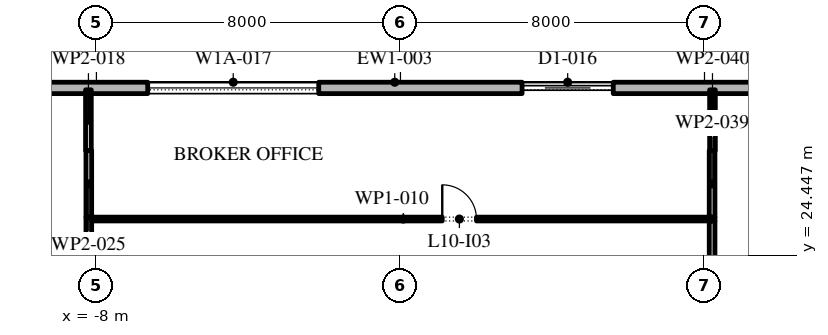
"""IFC4 building model, lengths in metres.
Left out: names, types, materials, properties, quantities, classifications, styles, units other than length and angle.
Written with IfcOpenShell. Run it as: python <this file> out.ifc"""

import sys

from ifc_helpers import new_model, si_unit, direction, frame, frame_2d, origin, place, context, subcontext, project, spatial, rectangle, extrude, element, fill, save


model = new_model("IFC4")
c1 = context("Model", 3, precision=1e-05, world=origin(), true_north=direction((0.0, 1.0)))
c2 = subcontext(c1, "Body", "Model", "MODEL_VIEW")
j1 = project(units=[si_unit("LENGTHUNIT", "METRE"), si_unit("PLANEANGLEUNIT", "RADIAN")], contexts=[c1])
p1 = place(None, origin())
s1 = spatial("IfcSite", under=j1, at=p1, CompositionType="ELEMENT")
p2 = place(p1, origin())
s2 = spatial("IfcBuilding", under=s1, at=p2, CompositionType="ELEMENT")
p3 = place(p2, frame((0.0, 0.0, 52.2)))
s3 = spatial("IfcBuildingStorey", under=s2, at=p3, CompositionType="ELEMENT", Elevation=52.2)
p4 = place(p3, frame((26.1, 28.85, 0.0), z_axis=(0.0, 0.0, 1.0), x_axis=(-1.0, 0.0, 0.0)))
e1 = element("IfcWall", 1, at=p4, inside=s3, PredefinedType="STANDARD", context=c2, shape_type="SweptSolid", body=[
    extrude(rectangle(XDim=52.5, YDim=0.3, at=frame_2d((26.25, 0.0))), origin(), (0.0, 0.0, 1.0), 4.0),
])
p5 = place(p4, frame((2.0, 0.0, 0.45)))
e2 = element("IfcOpeningElement", 2, at=p5, cuts=e1, PredefinedType="OPENING", context=c2, shape_type="SweptSolid", body=[
    extrude(rectangle(XDim=4.5, YDim=3.0, at=frame_2d((2.25, 1.5))), frame((0.0, 0.16, 0.0), z_axis=(0.0, -1.0, 0.0), x_axis=(1.0, 0.0, 0.0)), (0.0, 0.0, 1.0), 0.32),
])
p6 = place(p4, frame((10.65, 0.0, 0.45)))
e3 = element("IfcOpeningElement", 3, at=p6, cuts=e1, PredefinedType="OPENING", context=c2, shape_type="SweptSolid", body=[
    extrude(rectangle(XDim=4.5, YDim=3.0, at=frame_2d((2.25, 1.5))), frame((0.0, 0.16, 0.0), z_axis=(0.0, -1.0, 0.0), x_axis=(1.0, 0.0, 0.0)), (0.0, 0.0, 1.0), 0.32),
])
p7 = place(p4, frame((20.5, 0.0, 0.0)))
e4 = element("IfcOpeningElement", 4, at=p7, cuts=e1, PredefinedType="OPENING", context=c2, shape_type="SweptSolid", body=[
    extrude(rectangle(XDim=2.4, YDim=3.5, at=frame_2d((1.2, 1.75))), frame((0.0, 0.16, 0.0), z_axis=(0.0, -1.0, 0.0), x_axis=(1.0, 0.0, 0.0)), (0.0, 0.0, 1.0), 0.32),
])
p8 = place(p4, frame((28.25, 0.0, 0.45)))
e5 = element("IfcOpeningElement", 5, at=p8, cuts=e1, PredefinedType="OPENING", context=c2, shape_type="SweptSolid", body=[
    extrude(rectangle(XDim=4.5, YDim=3.0, at=frame_2d((2.25, 1.5))), frame((0.0, 0.16, 0.0), z_axis=(0.0, -1.0, 0.0), x_axis=(1.0, 0.0, 0.0)), (0.0, 0.0, 1.0), 0.32),
])
p9 = place(p4, frame((37.05, 0.0, 0.45)))
e6 = element("IfcOpeningElement", 6, at=p9, cuts=e1, PredefinedType="OPENING", context=c2, shape_type="SweptSolid", body=[
    extrude(rectangle(XDim=4.5, YDim=3.0, at=frame_2d((2.25, 1.5))), frame((0.0, 0.16, 0.0), z_axis=(0.0, -1.0, 0.0), x_axis=(1.0, 0.0, 0.0)), (0.0, 0.0, 1.0), 0.32),
])
p10 = place(p4, frame((45.85, 0.0, 0.45)))
e7 = element("IfcOpeningElement", 7, at=p10, cuts=e1, PredefinedType="OPENING", context=c2, shape_type="SweptSolid", body=[
    extrude(rectangle(XDim=4.5, YDim=3.0, at=frame_2d((2.25, 1.5))), frame((0.0, 0.16, 0.0), z_axis=(0.0, -1.0, 0.0), x_axis=(1.0, 0.0, 0.0)), (0.0, 0.0, 1.0), 0.32),
])
p11 = place(p3, frame((-8.21, 28.8, 0.0), z_axis=(0.0, 0.0, 1.0), x_axis=(0.0, -1.0, 0.0)))
e8 = element("IfcWall", 8, at=p11, inside=s3, PredefinedType="PARTITIONING", context=c2, shape_type="SweptSolid", body=[
    extrude(rectangle(XDim=1.6, YDim=0.15, at=frame_2d((0.8, 0.0))), origin(), (0.0, 0.0, 1.0), 4.0),
])
p12 = place(p3, frame((-8.2, 25.45, 0.0), z_axis=(0.0, 0.0, 1.0), x_axis=(0.0, -1.0, 0.0)))
e9 = element("IfcWall", 9, at=p12, inside=s3, PredefinedType="PARTITIONING", context=c2, shape_type="SweptSolid", body=[
    extrude(rectangle(XDim=6.375, YDim=0.15, at=frame_2d((3.188, 0.0))), origin(), (0.0, 0.0, 1.0), 4.0),
])
p13 = place(p3, frame((-8.125, 25.4, 0.0), z_axis=(0.0, 0.0, 1.0), x_axis=(1.0, 0.0, 0.0)))
e10 = element("IfcWall", 10, at=p13, inside=s3, PredefinedType="PARTITIONING", context=c2, shape_type="SweptSolid", body=[
    extrude(rectangle(XDim=16.4, YDim=0.1, at=frame_2d((8.2, 0.0))), origin(), (0.0, 0.0, 1.0), 4.0),
])
p14 = place(p13, frame((9.225, 0.0, 0.0)))
e11 = element("IfcOpeningElement", 11, at=p14, cuts=e10, PredefinedType="OPENING", context=c2, shape_type="SweptSolid", body=[
    extrude(rectangle(XDim=0.9, YDim=2.1, at=frame_2d((0.45, 1.05))), frame((0.0, 0.06, 0.0), z_axis=(0.0, -1.0, 0.0), x_axis=(1.0, 0.0, 0.0)), (0.0, 0.0, 1.0), 0.12),
])
p15 = place(p3, frame((-8.2, 27.2, 0.0), z_axis=(0.0, 0.0, 1.0), x_axis=(0.0, -1.0, 0.0)))
e12 = element("IfcWall", 12, at=p15, inside=s3, PredefinedType="PARTITIONING", context=c2, shape_type="SweptSolid", body=[
    extrude(rectangle(XDim=1.75, YDim=0.15, at=frame_2d((0.875, 0.0))), origin(), (0.0, 0.0, 1.0), 4.0),
])
p16 = place(p3, frame((8.2, 19.075, 0.0), z_axis=(0.0, 0.0, 1.0), x_axis=(0.0, 1.0, 0.0)))
e13 = element("IfcWall", 13, at=p16, inside=s3, PredefinedType="PARTITIONING", context=c2, shape_type="SweptSolid", body=[
    extrude(rectangle(XDim=6.275, YDim=0.15, at=frame_2d((3.138, 0.0))), origin(), (0.0, 0.0, 1.0), 4.0),
])
p17 = place(p3, frame((8.2, 25.45, 0.0), z_axis=(0.0, 0.0, 1.0), x_axis=(0.0, 1.0, 0.0)))
e14 = element("IfcWall", 14, at=p17, inside=s3, PredefinedType="PARTITIONING", context=c2, shape_type="SweptSolid", body=[
    extrude(rectangle(XDim=1.75, YDim=0.15, at=frame_2d((0.875, 0.0))), origin(), (0.0, 0.0, 1.0), 4.0),
])
p18 = place(p3, frame((8.21, 27.2, 0.0), z_axis=(0.0, 0.0, 1.0), x_axis=(0.0, 1.0, 0.0)))
e15 = element("IfcWall", 15, at=p18, inside=s3, PredefinedType="PARTITIONING", context=c2, shape_type="SweptSolid", body=[
    extrude(rectangle(XDim=1.6, YDim=0.15, at=frame_2d((0.8, 0.0))), origin(), (0.0, 0.0, 1.0), 4.0),
])
p19 = place(p7, origin())
e16 = element("IfcDoor", 16, at=p19, inside=s3, OperationType="DOUBLE_DOOR_SLIDING", PredefinedType="DOOR", context=c2, shape_type="SweptSolid", body=[
    extrude(rectangle(XDim=2.4, YDim=3.5, at=frame_2d((1.2, 1.75))), frame((0.0, 0.025, 0.0), z_axis=(0.0, -1.0, 0.0), x_axis=(1.0, 0.0, 0.0)), (0.0, 0.0, 1.0), 0.05),
])
fill(e4, e16)
p20 = place(p8, origin())
e17 = element("IfcWindow", 17, at=p20, inside=s3, PartitioningType="DOUBLE_PANEL_VERTICAL", PredefinedType="WINDOW", context=c2, shape_type="SweptSolid", body=[
    extrude(rectangle(XDim=4.5, YDim=3.0, at=frame_2d((2.25, 1.5))), frame((0.0, 0.03, 0.0), z_axis=(0.0, -1.0, 0.0), x_axis=(1.0, 0.0, 0.0)), (0.0, 0.0, 1.0), 0.06),
])
fill(e5, e17)
p21 = place(p14, origin())
e18 = element("IfcDoor", 18, at=p21, inside=s3, OperationType="SINGLE_SWING_RIGHT", PredefinedType="DOOR", context=c2, shape_type="SweptSolid", body=[
    extrude(rectangle(XDim=0.9, YDim=2.1, at=frame_2d((0.45, 1.05))), frame((0.0, 0.025, 0.0), z_axis=(0.0, -1.0, 0.0), x_axis=(1.0, 0.0, 0.0)), (0.0, 0.0, 1.0), 0.05),
])
fill(e11, e18)
save(model, sys.argv[1])
